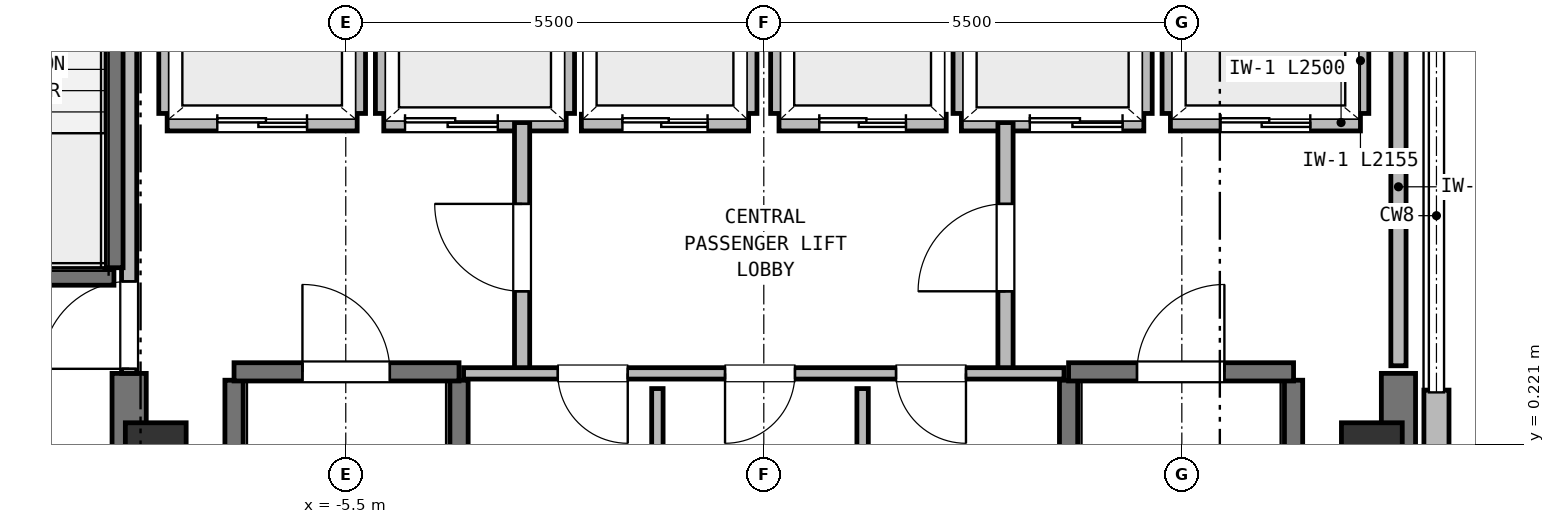
"""IFC4 building model, lengths in metres.
Left out: names, types, materials, properties, quantities, classifications, styles, units other than length and angle.
Written with IfcOpenShell. Run it as: python <this file> out.ifc"""

import sys

from ifc_helpers import new_model, si_unit, direction, frame, frame_2d, origin, origin_2d, place, context, subcontext, project, spatial, rectangle, extrude, element, fill, save


model = new_model("IFC4")
c1 = context("Model", 3, precision=1e-05, world=origin(), true_north=direction((0.0, 1.0)))
c2 = subcontext(c1, "Body", "Model", "MODEL_VIEW")
j1 = project(units=[si_unit("LENGTHUNIT", "METRE"), si_unit("PLANEANGLEUNIT", "RADIAN")], contexts=[c1])
p1 = place(None, origin())
s1 = spatial("IfcSite", under=j1, at=p1, CompositionType="ELEMENT")
p2 = place(p1, origin())
s2 = spatial("IfcBuilding", under=s1, at=p2, CompositionType="ELEMENT")
p3 = place(p2, frame((0.0, 0.0, 299.2)))
s3 = spatial("IfcBuildingStorey", under=s2, at=p3, CompositionType="ELEMENT", Elevation=299.2)
for number, where, z_axis, x_axis in (
    (1, (8.0, 0.0, 0.0), (0.0, 0.0, 1.0), (1.0, 0.0, 0.0)),
    (2, (-8.0, 0.0, 0.0), (0.0, 0.0, 1.0), (1.0, 0.0, 0.0)),
):
    element("IfcColumn", number, at=place(p3, frame(where, z_axis=z_axis, x_axis=x_axis)), inside=s3, PredefinedType="COLUMN", context=c2, shape_type="SweptSolid", body=[
        extrude(rectangle(XDim=0.8, YDim=1.0, at=origin_2d()), origin(), (0.0, 0.0, 1.0), 4.4),
    ])
for number, where, z_axis, x_axis in (
    (3, (-8.35, -6.95, 0.0), (0.0, 0.0, 1.0), (0.0, 1.0, 0.0)),
    (4, (8.35, -6.95, 0.0), (0.0, 0.0, 1.0), (0.0, 1.0, 0.0)),
):
    element("IfcWall", number, at=place(p3, frame(where, z_axis=z_axis, x_axis=x_axis)), inside=s3, PredefinedType="SHEAR", context=c2, shape_type="SweptSolid", body=[
        extrude(rectangle(XDim=8.1, YDim=0.45, at=frame_2d((4.05, 0.0))), origin(), (0.0, 0.0, 1.0), 4.12),
    ])
p4 = place(p3, frame((8.85, 0.93, 0.0), z_axis=(0.0, 0.0, 1.0), x_axis=(0.0, -1.0, 0.0)))
e5 = element("IfcWall", 5, at=p4, inside=s3, PredefinedType="SOLIDWALL", context=c2, shape_type="SweptSolid", body=[
    extrude(rectangle(XDim=1.86, YDim=0.33, at=frame_2d((0.93, 0.0))), origin(), (0.0, 0.0, 1.0), 4.12),
])
for number, where, z_axis, x_axis in (
    (6, (-6.97, -6.16, 0.0), (0.0, 0.0, 1.0), (0.0, 1.0, 0.0)),
    (7, (-4.01, -6.16, 0.0), (0.0, 0.0, 1.0), (0.0, 1.0, 0.0)),
):
    element("IfcWall", number, at=place(p3, frame(where, z_axis=z_axis, x_axis=x_axis)), inside=s3, PredefinedType="SHEAR", context=c2, shape_type="SweptSolid", body=[
        extrude(rectangle(XDim=7.22, YDim=0.24, at=frame_2d((3.61, 0.0))), origin(), (0.0, 0.0, 1.0), 4.12),
    ])
p5 = place(p3, frame((-6.97, 1.17, 0.0), z_axis=(0.0, 0.0, 1.0), x_axis=(1.0, 0.0, 0.0)))
e8 = element("IfcWall", 8, at=p5, inside=s3, PredefinedType="SHEAR", context=c2, shape_type="SweptSolid", body=[
    extrude(rectangle(XDim=2.96, YDim=0.24, at=frame_2d((1.48, 0.0))), origin(), (0.0, 0.0, 1.0), 4.12),
])
p6 = place(p5, frame((0.9, 0.0, 0.0)))
e9 = element("IfcOpeningElement", 9, at=p6, cuts=e8, PredefinedType="OPENING", context=c2, shape_type="SweptSolid", body=[
    extrude(rectangle(XDim=1.15, YDim=2.15, at=frame_2d((0.575, 1.075))), frame((0.0, 0.13, 0.0), z_axis=(0.0, -1.0, 0.0), x_axis=(1.0, 0.0, 0.0)), (0.0, 0.0, 1.0), 0.26),
])
for number, where, z_axis, x_axis in (
    (10, (4.01, -6.16, 0.0), (0.0, 0.0, 1.0), (0.0, 1.0, 0.0)),
    (11, (6.97, -6.16, 0.0), (0.0, 0.0, 1.0), (0.0, 1.0, 0.0)),
):
    element("IfcWall", number, at=place(p3, frame(where, z_axis=z_axis, x_axis=x_axis)), inside=s3, PredefinedType="SHEAR", context=c2, shape_type="SweptSolid", body=[
        extrude(rectangle(XDim=7.22, YDim=0.24, at=frame_2d((3.61, 0.0))), origin(), (0.0, 0.0, 1.0), 4.12),
    ])
p7 = place(p3, frame((4.01, 1.17, 0.0), z_axis=(0.0, 0.0, 1.0), x_axis=(1.0, 0.0, 0.0)))
e12 = element("IfcWall", 12, at=p7, inside=s3, PredefinedType="SHEAR", context=c2, shape_type="SweptSolid", body=[
    extrude(rectangle(XDim=2.96, YDim=0.24, at=frame_2d((1.48, 0.0))), origin(), (0.0, 0.0, 1.0), 4.12),
])
p8 = place(p7, frame((0.9, 0.0, 0.0)))
e13 = element("IfcOpeningElement", 13, at=p8, cuts=e12, PredefinedType="OPENING", context=c2, shape_type="SweptSolid", body=[
    extrude(rectangle(XDim=1.15, YDim=2.15, at=frame_2d((0.575, 1.075))), frame((0.0, 0.13, 0.0), z_axis=(0.0, -1.0, 0.0), x_axis=(1.0, 0.0, 0.0)), (0.0, 0.0, 1.0), 0.26),
])
p9 = place(p3, frame((-7.85, 4.45, 0.0), z_axis=(0.0, 0.0, 1.0), x_axis=(1.0, 0.0, 0.0)))
e14 = element("IfcWall", 14, at=p9, inside=s3, PredefinedType="PARTITIONING", context=c2, shape_type="SweptSolid", body=[
    extrude(rectangle(XDim=2.5, YDim=0.22, at=frame_2d((1.25, 0.0))), origin(), (0.0, 0.0, 1.0), 4.12),
])
p10 = place(p9, frame((0.66, 0.0, 0.0)))
e15 = element("IfcOpeningElement", 15, at=p10, cuts=e14, PredefinedType="OPENING", context=c2, shape_type="SweptSolid", body=[
    extrude(rectangle(XDim=1.18, YDim=2.15, at=frame_2d((0.59, 1.075))), frame((0.0, 0.12, 0.0), z_axis=(0.0, -1.0, 0.0), x_axis=(1.0, 0.0, 0.0)), (0.0, 0.0, 1.0), 0.24),
])
p11 = place(p3, frame((-7.85, 4.57, 0.0), z_axis=(0.0, 0.0, 1.0), x_axis=(0.0, 1.0, 0.0)))
e16 = element("IfcWall", 16, at=p11, inside=s3, PredefinedType="PARTITIONING", context=c2, shape_type="SweptSolid", body=[
    extrude(rectangle(XDim=2.155, YDim=0.22, at=frame_2d((1.078, 0.0))), origin(), (0.0, 0.0, 1.0), 3.8),
])
p12 = place(p3, frame((-5.35, 4.57, 0.0), z_axis=(0.0, 0.0, 1.0), x_axis=(0.0, 1.0, 0.0)))
e17 = element("IfcWall", 17, at=p12, inside=s3, PredefinedType="PARTITIONING", context=c2, shape_type="SweptSolid", body=[
    extrude(rectangle(XDim=2.155, YDim=0.22, at=frame_2d((1.078, 0.0))), origin(), (0.0, 0.0, 1.0), 4.12),
])
p13 = place(p3, frame((5.35, 4.45, 0.0), z_axis=(0.0, 0.0, 1.0), x_axis=(1.0, 0.0, 0.0)))
e18 = element("IfcWall", 18, at=p13, inside=s3, PredefinedType="PARTITIONING", context=c2, shape_type="SweptSolid", body=[
    extrude(rectangle(XDim=2.5, YDim=0.22, at=frame_2d((1.25, 0.0))), origin(), (0.0, 0.0, 1.0), 4.12),
])
p14 = place(p13, frame((0.66, 0.0, 0.0)))
e19 = element("IfcOpeningElement", 19, at=p14, cuts=e18, PredefinedType="OPENING", context=c2, shape_type="SweptSolid", body=[
    extrude(rectangle(XDim=1.18, YDim=2.15, at=frame_2d((0.59, 1.075))), frame((0.0, 0.12, 0.0), z_axis=(0.0, -1.0, 0.0), x_axis=(1.0, 0.0, 0.0)), (0.0, 0.0, 1.0), 0.24),
])
p15 = place(p3, frame((5.35, 4.57, 0.0), z_axis=(0.0, 0.0, 1.0), x_axis=(0.0, 1.0, 0.0)))
e20 = element("IfcWall", 20, at=p15, inside=s3, PredefinedType="PARTITIONING", context=c2, shape_type="SweptSolid", body=[
    extrude(rectangle(XDim=2.155, YDim=0.22, at=frame_2d((1.078, 0.0))), origin(), (0.0, 0.0, 1.0), 4.12),
])
p16 = place(p3, frame((7.85, 4.57, 0.0), z_axis=(0.0, 0.0, 1.0), x_axis=(0.0, 1.0, 0.0)))
e21 = element("IfcWall", 21, at=p16, inside=s3, PredefinedType="PARTITIONING", context=c2, shape_type="SweptSolid", body=[
    extrude(rectangle(XDim=2.155, YDim=0.22, at=frame_2d((1.078, 0.0))), origin(), (0.0, 0.0, 1.0), 3.8),
])
p17 = place(p3, frame((-5.0, 4.45, 0.0), z_axis=(0.0, 0.0, 1.0), x_axis=(1.0, 0.0, 0.0)))
e22 = element("IfcWall", 22, at=p17, inside=s3, PredefinedType="PARTITIONING", context=c2, shape_type="SweptSolid", body=[
    extrude(rectangle(XDim=2.4, YDim=0.22, at=frame_2d((1.2, 0.0))), origin(), (0.0, 0.0, 1.0), 4.12),
])
p18 = place(p17, frame((0.28, 0.0, 0.0)))
e23 = element("IfcOpeningElement", 23, at=p18, cuts=e22, PredefinedType="OPENING", context=c2, shape_type="SweptSolid", body=[
    extrude(rectangle(XDim=1.22, YDim=2.15, at=frame_2d((0.61, 1.075))), frame((0.0, 0.12, 0.0), z_axis=(0.0, -1.0, 0.0), x_axis=(1.0, 0.0, 0.0)), (0.0, 0.0, 1.0), 0.24),
])
for number, where, z_axis, x_axis in (
    (24, (-5.0, 4.57, 0.0), (0.0, 0.0, 1.0), (0.0, 1.0, 0.0)),
    (25, (-2.6, 4.57, 0.0), (0.0, 0.0, 1.0), (0.0, 1.0, 0.0)),
):
    element("IfcWall", number, at=place(p3, frame(where, z_axis=z_axis, x_axis=x_axis)), inside=s3, PredefinedType="PARTITIONING", context=c2, shape_type="SweptSolid", body=[
        extrude(rectangle(XDim=2.155, YDim=0.22, at=frame_2d((1.078, 0.0))), origin(), (0.0, 0.0, 1.0), 4.12),
    ])
p19 = place(p3, frame((2.6, 4.45, 0.0), z_axis=(0.0, 0.0, 1.0), x_axis=(1.0, 0.0, 0.0)))
e26 = element("IfcWall", 26, at=p19, inside=s3, PredefinedType="PARTITIONING", context=c2, shape_type="SweptSolid", body=[
    extrude(rectangle(XDim=2.4, YDim=0.22, at=frame_2d((1.2, 0.0))), origin(), (0.0, 0.0, 1.0), 4.12),
])
p20 = place(p19, frame((0.9, 0.0, 0.0)))
e27 = element("IfcOpeningElement", 27, at=p20, cuts=e26, PredefinedType="OPENING", context=c2, shape_type="SweptSolid", body=[
    extrude(rectangle(XDim=1.22, YDim=2.15, at=frame_2d((0.61, 1.075))), frame((0.0, 0.12, 0.0), z_axis=(0.0, -1.0, 0.0), x_axis=(1.0, 0.0, 0.0)), (0.0, 0.0, 1.0), 0.24),
])
for number, where, z_axis, x_axis in (
    (28, (2.6, 4.57, 0.0), (0.0, 0.0, 1.0), (0.0, 1.0, 0.0)),
    (29, (5.0, 4.57, 0.0), (0.0, 0.0, 1.0), (0.0, 1.0, 0.0)),
):
    element("IfcWall", number, at=place(p3, frame(where, z_axis=z_axis, x_axis=x_axis)), inside=s3, PredefinedType="PARTITIONING", context=c2, shape_type="SweptSolid", body=[
        extrude(rectangle(XDim=2.155, YDim=0.22, at=frame_2d((1.078, 0.0))), origin(), (0.0, 0.0, 1.0), 4.12),
    ])
p21 = place(p3, frame((-2.4, 4.45, 0.0), z_axis=(0.0, 0.0, 1.0), x_axis=(1.0, 0.0, 0.0)))
e30 = element("IfcWall", 30, at=p21, inside=s3, PredefinedType="PARTITIONING", context=c2, shape_type="SweptSolid", body=[
    extrude(rectangle(XDim=2.2, YDim=0.22, at=frame_2d((1.1, 0.0))), origin(), (0.0, 0.0, 1.0), 4.12),
])
p22 = place(p21, frame((0.54, 0.0, 0.0)))
e31 = element("IfcOpeningElement", 31, at=p22, cuts=e30, PredefinedType="OPENING", context=c2, shape_type="SweptSolid", body=[
    extrude(rectangle(XDim=1.12, YDim=2.15, at=frame_2d((0.56, 1.075))), frame((0.0, 0.12, 0.0), z_axis=(0.0, -1.0, 0.0), x_axis=(1.0, 0.0, 0.0)), (0.0, 0.0, 1.0), 0.24),
])
p23 = place(p3, frame((-0.2, 4.57, 0.0), z_axis=(0.0, 0.0, 1.0), x_axis=(0.0, 1.0, 0.0)))
e32 = element("IfcWall", 32, at=p23, inside=s3, PredefinedType="PARTITIONING", context=c2, shape_type="SweptSolid", body=[
    extrude(rectangle(XDim=2.155, YDim=0.22, at=frame_2d((1.078, 0.0))), origin(), (0.0, 0.0, 1.0), 4.12),
])
p24 = place(p3, frame((0.2, 4.45, 0.0), z_axis=(0.0, 0.0, 1.0), x_axis=(1.0, 0.0, 0.0)))
e33 = element("IfcWall", 33, at=p24, inside=s3, PredefinedType="PARTITIONING", context=c2, shape_type="SweptSolid", body=[
    extrude(rectangle(XDim=2.2, YDim=0.22, at=frame_2d((1.1, 0.0))), origin(), (0.0, 0.0, 1.0), 4.12),
])
p25 = place(p24, frame((0.53, 0.0, 0.0)))
e34 = element("IfcOpeningElement", 34, at=p25, cuts=e33, PredefinedType="OPENING", context=c2, shape_type="SweptSolid", body=[
    extrude(rectangle(XDim=1.14, YDim=2.15, at=frame_2d((0.57, 1.075))), frame((0.0, 0.12, 0.0), z_axis=(0.0, -1.0, 0.0), x_axis=(1.0, 0.0, 0.0)), (0.0, 0.0, 1.0), 0.24),
])
p26 = place(p3, frame((0.2, 4.57, 0.0), z_axis=(0.0, 0.0, 1.0), x_axis=(0.0, 1.0, 0.0)))
e35 = element("IfcWall", 35, at=p26, inside=s3, PredefinedType="PARTITIONING", context=c2, shape_type="SweptSolid", body=[
    extrude(rectangle(XDim=2.155, YDim=0.22, at=frame_2d((1.078, 0.0))), origin(), (0.0, 0.0, 1.0), 4.12),
])
p27 = place(p3, frame((-3.18, 1.15, 0.0), z_axis=(0.0, 0.0, 1.0), x_axis=(0.0, 1.0, 0.0)))
e36 = element("IfcWall", 36, at=p27, inside=s3, PredefinedType="PARTITIONING", context=c2, shape_type="SweptSolid", body=[
    extrude(rectangle(XDim=3.3, YDim=0.2, at=frame_2d((1.65, 0.0))), origin(), (0.0, 0.0, 1.0), 4.12),
])
p28 = place(p27, frame((1.08, 0.0, 0.0)))
e37 = element("IfcOpeningElement", 37, at=p28, cuts=e36, PredefinedType="OPENING", context=c2, shape_type="SweptSolid", body=[
    extrude(rectangle(XDim=1.15, YDim=2.15, at=frame_2d((0.575, 1.075))), frame((0.0, 0.11, 0.0), z_axis=(0.0, -1.0, 0.0), x_axis=(1.0, 0.0, 0.0)), (0.0, 0.0, 1.0), 0.22),
])
p29 = place(p3, frame((3.18, 1.15, 0.0), z_axis=(0.0, 0.0, 1.0), x_axis=(0.0, 1.0, 0.0)))
e38 = element("IfcWall", 38, at=p29, inside=s3, PredefinedType="PARTITIONING", context=c2, shape_type="SweptSolid", body=[
    extrude(rectangle(XDim=3.3, YDim=0.2, at=frame_2d((1.65, 0.0))), origin(), (0.0, 0.0, 1.0), 4.12),
])
p30 = place(p29, frame((1.08, 0.0, 0.0)))
e39 = element("IfcOpeningElement", 39, at=p30, cuts=e38, PredefinedType="OPENING", context=c2, shape_type="SweptSolid", body=[
    extrude(rectangle(XDim=1.15, YDim=2.15, at=frame_2d((0.575, 1.075))), frame((0.0, 0.11, 0.0), z_axis=(0.0, -1.0, 0.0), x_axis=(1.0, 0.0, 0.0)), (0.0, 0.0, 1.0), 0.22),
])
p31 = place(p3, frame((-8.35, 1.15, 0.0), z_axis=(0.0, 0.0, 1.0), x_axis=(0.0, 1.0, 0.0)))
e40 = element("IfcWall", 40, at=p31, inside=s3, PredefinedType="PARTITIONING", context=c2, shape_type="SweptSolid", body=[
    extrude(rectangle(XDim=5.4, YDim=0.2, at=frame_2d((2.7, 0.0))), origin(), (0.0, 0.0, 1.0), 4.12),
])
p32 = place(p31, frame((0.06, 0.0, 0.0)))
e41 = element("IfcOpeningElement", 41, at=p32, cuts=e40, PredefinedType="OPENING", context=c2, shape_type="SweptSolid", body=[
    extrude(rectangle(XDim=1.15, YDim=2.15, at=frame_2d((0.575, 1.075))), frame((0.0, 0.11, 0.0), z_axis=(0.0, -1.0, 0.0), x_axis=(1.0, 0.0, 0.0)), (0.0, 0.0, 1.0), 0.22),
])
p33 = place(p3, frame((8.35, 1.25, 0.0), z_axis=(0.0, 0.0, 1.0), x_axis=(0.0, 1.0, 0.0)))
e42 = element("IfcWall", 42, at=p33, inside=s3, PredefinedType="PARTITIONING", context=c2, shape_type="SweptSolid", body=[
    extrude(rectangle(XDim=5.3, YDim=0.2, at=frame_2d((2.65, 0.0))), origin(), (0.0, 0.0, 1.0), 4.12),
])
p34 = place(p3, frame((3.95, 1.15, 0.0), z_axis=(0.0, 0.0, 1.0), x_axis=(-1.0, 0.0, 0.0)))
e43 = element("IfcWall", 43, at=p34, inside=s3, PredefinedType="PARTITIONING", context=c2, shape_type="SweptSolid", body=[
    extrude(rectangle(XDim=7.9, YDim=0.15, at=frame_2d((3.95, 0.0))), origin(), (0.0, 0.0, 1.0), 4.12),
])
p35 = place(p34, frame((5.74, 0.0, 0.0)))
e44 = element("IfcOpeningElement", 44, at=p35, cuts=e43, PredefinedType="OPENING", context=c2, shape_type="SweptSolid", body=[
    extrude(rectangle(XDim=0.92, YDim=2.05, at=frame_2d((0.46, 1.025))), frame((0.0, 0.085, 0.0), z_axis=(0.0, -1.0, 0.0), x_axis=(1.0, 0.0, 0.0)), (0.0, 0.0, 1.0), 0.17),
])
p36 = place(p34, frame((3.54, 0.0, 0.0)))
e45 = element("IfcOpeningElement", 45, at=p36, cuts=e43, PredefinedType="OPENING", context=c2, shape_type="SweptSolid", body=[
    extrude(rectangle(XDim=0.92, YDim=2.05, at=frame_2d((0.46, 1.025))), frame((0.0, 0.085, 0.0), z_axis=(0.0, -1.0, 0.0), x_axis=(1.0, 0.0, 0.0)), (0.0, 0.0, 1.0), 0.17),
])
p37 = place(p34, frame((1.29, 0.0, 0.0)))
e46 = element("IfcOpeningElement", 46, at=p37, cuts=e43, PredefinedType="OPENING", context=c2, shape_type="SweptSolid", body=[
    extrude(rectangle(XDim=0.92, YDim=2.05, at=frame_2d((0.46, 1.025))), frame((0.0, 0.085, 0.0), z_axis=(0.0, -1.0, 0.0), x_axis=(1.0, 0.0, 0.0)), (0.0, 0.0, 1.0), 0.17),
])
for number, where, z_axis, x_axis in (
    (47, (-1.4, -6.58, 0.0), (0.0, 0.0, 1.0), (0.0, 1.0, 0.0)),
    (48, (1.3, -6.58, 0.0), (0.0, 0.0, 1.0), (0.0, 1.0, 0.0)),
):
    element("IfcWall", number, at=place(p3, frame(where, z_axis=z_axis, x_axis=x_axis)), inside=s3, PredefinedType="PARTITIONING", context=c2, shape_type="SweptSolid", body=[
        extrude(rectangle(XDim=7.53, YDim=0.15, at=frame_2d((3.765, 0.0))), origin(), (0.0, 0.0, 1.0), 4.12),
    ])
p38 = place(p3, frame((-11.51, 2.43, 0.0), z_axis=(0.0, 0.0, 1.0), x_axis=(1.0, 0.0, 0.0)))
e49 = element("IfcWall", 49, at=p38, inside=s3, PredefinedType="SHEAR", context=c2, shape_type="SweptSolid", body=[
    extrude(rectangle(XDim=2.96, YDim=0.24, at=frame_2d((1.48, 0.0))), origin(), (0.0, 0.0, 1.0), 4.12),
])
p39 = place(p3, frame((-8.55, 2.54, 0.0), z_axis=(0.0, 0.0, 1.0), x_axis=(0.0, 1.0, 0.0)))
e50 = element("IfcWall", 50, at=p39, inside=s3, PredefinedType="SHEAR", context=c2, shape_type="SweptSolid", body=[
    extrude(rectangle(XDim=6.42, YDim=0.24, at=frame_2d((3.21, 0.0))), origin(), (0.0, 0.0, 1.0), 4.12),
])
p40 = place(p6, origin())
e51 = element("IfcDoor", 51, at=p40, inside=s3, OperationType="SINGLE_SWING_LEFT", PredefinedType="DOOR", context=c2, shape_type="SweptSolid", body=[
    extrude(rectangle(XDim=1.15, YDim=2.15, at=frame_2d((0.575, 1.075))), frame((0.0, 0.025, 0.0), z_axis=(0.0, -1.0, 0.0), x_axis=(1.0, 0.0, 0.0)), (0.0, 0.0, 1.0), 0.05),
])
fill(e9, e51)
p41 = place(p8, origin())
e52 = element("IfcDoor", 52, at=p41, inside=s3, OperationType="SINGLE_SWING_RIGHT", PredefinedType="DOOR", context=c2, shape_type="SweptSolid", body=[
    extrude(rectangle(XDim=1.15, YDim=2.15, at=frame_2d((0.575, 1.075))), frame((0.0, 0.025, 0.0), z_axis=(0.0, -1.0, 0.0), x_axis=(1.0, 0.0, 0.0)), (0.0, 0.0, 1.0), 0.05),
])
fill(e13, e52)
p42 = place(p10, origin())
e53 = element("IfcDoor", 53, at=p42, inside=s3, OperationType="DOUBLE_DOOR_SLIDING", PredefinedType="DOOR", context=c2, shape_type="SweptSolid", body=[
    extrude(rectangle(XDim=1.18, YDim=2.15, at=frame_2d((0.59, 1.075))), frame((0.0, 0.025, 0.0), z_axis=(0.0, -1.0, 0.0), x_axis=(1.0, 0.0, 0.0)), (0.0, 0.0, 1.0), 0.05),
])
fill(e15, e53)
p43 = place(p14, origin())
e54 = element("IfcDoor", 54, at=p43, inside=s3, OperationType="DOUBLE_DOOR_SLIDING", PredefinedType="DOOR", context=c2, shape_type="SweptSolid", body=[
    extrude(rectangle(XDim=1.18, YDim=2.15, at=frame_2d((0.59, 1.075))), frame((0.0, 0.025, 0.0), z_axis=(0.0, -1.0, 0.0), x_axis=(1.0, 0.0, 0.0)), (0.0, 0.0, 1.0), 0.05),
])
fill(e19, e54)
p44 = place(p18, origin())
e55 = element("IfcDoor", 55, at=p44, inside=s3, OperationType="DOUBLE_DOOR_SLIDING", PredefinedType="DOOR", context=c2, shape_type="SweptSolid", body=[
    extrude(rectangle(XDim=1.22, YDim=2.15, at=frame_2d((0.61, 1.075))), frame((0.0, 0.025, 0.0), z_axis=(0.0, -1.0, 0.0), x_axis=(1.0, 0.0, 0.0)), (0.0, 0.0, 1.0), 0.05),
])
fill(e23, e55)
p45 = place(p20, origin())
e56 = element("IfcDoor", 56, at=p45, inside=s3, OperationType="DOUBLE_DOOR_SLIDING", PredefinedType="DOOR", context=c2, shape_type="SweptSolid", body=[
    extrude(rectangle(XDim=1.22, YDim=2.15, at=frame_2d((0.61, 1.075))), frame((0.0, 0.025, 0.0), z_axis=(0.0, -1.0, 0.0), x_axis=(1.0, 0.0, 0.0)), (0.0, 0.0, 1.0), 0.05),
])
fill(e27, e56)
p46 = place(p22, origin())
e57 = element("IfcDoor", 57, at=p46, inside=s3, OperationType="DOUBLE_DOOR_SLIDING", PredefinedType="DOOR", context=c2, shape_type="SweptSolid", body=[
    extrude(rectangle(XDim=1.12, YDim=2.15, at=frame_2d((0.56, 1.075))), frame((0.0, 0.025, 0.0), z_axis=(0.0, -1.0, 0.0), x_axis=(1.0, 0.0, 0.0)), (0.0, 0.0, 1.0), 0.05),
])
fill(e31, e57)
p47 = place(p25, origin())
e58 = element("IfcDoor", 58, at=p47, inside=s3, OperationType="DOUBLE_DOOR_SLIDING", PredefinedType="DOOR", context=c2, shape_type="SweptSolid", body=[
    extrude(rectangle(XDim=1.14, YDim=2.15, at=frame_2d((0.57, 1.075))), frame((0.0, 0.025, 0.0), z_axis=(0.0, -1.0, 0.0), x_axis=(1.0, 0.0, 0.0)), (0.0, 0.0, 1.0), 0.05),
])
fill(e34, e58)
p48 = place(p28, origin())
e59 = element("IfcDoor", 59, at=p48, inside=s3, OperationType="SINGLE_SWING_RIGHT", PredefinedType="DOOR", context=c2, shape_type="SweptSolid", body=[
    extrude(rectangle(XDim=1.15, YDim=2.15, at=frame_2d((0.575, 1.075))), frame((0.0, 0.025, 0.0), z_axis=(0.0, -1.0, 0.0), x_axis=(1.0, 0.0, 0.0)), (0.0, 0.0, 1.0), 0.05),
])
fill(e37, e59)
p49 = place(p30, origin())
e60 = element("IfcDoor", 60, at=p49, inside=s3, OperationType="SINGLE_SWING_LEFT", PredefinedType="DOOR", context=c2, shape_type="SweptSolid", body=[
    extrude(rectangle(XDim=1.15, YDim=2.15, at=frame_2d((0.575, 1.075))), frame((0.0, 0.025, 0.0), z_axis=(0.0, -1.0, 0.0), x_axis=(1.0, 0.0, 0.0)), (0.0, 0.0, 1.0), 0.05),
])
fill(e39, e60)
p50 = place(p32, origin())
e61 = element("IfcDoor", 61, at=p50, inside=s3, OperationType="SINGLE_SWING_LEFT", PredefinedType="DOOR", context=c2, shape_type="SweptSolid", body=[
    extrude(rectangle(XDim=1.15, YDim=2.15, at=frame_2d((0.575, 1.075))), frame((0.0, 0.025, 0.0), z_axis=(0.0, -1.0, 0.0), x_axis=(1.0, 0.0, 0.0)), (0.0, 0.0, 1.0), 0.05),
])
fill(e41, e61)
p51 = place(p35, origin())
e62 = element("IfcDoor", 62, at=p51, inside=s3, OperationType="SINGLE_SWING_LEFT", PredefinedType="DOOR", context=c2, shape_type="SweptSolid", body=[
    extrude(rectangle(XDim=0.92, YDim=2.05, at=frame_2d((0.46, 1.025))), frame((0.0, 0.025, 0.0), z_axis=(0.0, -1.0, 0.0), x_axis=(1.0, 0.0, 0.0)), (0.0, 0.0, 1.0), 0.05),
])
fill(e44, e62)
p52 = place(p36, origin())
e63 = element("IfcDoor", 63, at=p52, inside=s3, OperationType="SINGLE_SWING_RIGHT", PredefinedType="DOOR", context=c2, shape_type="SweptSolid", body=[
    extrude(rectangle(XDim=0.92, YDim=2.05, at=frame_2d((0.46, 1.025))), frame((0.0, 0.025, 0.0), z_axis=(0.0, -1.0, 0.0), x_axis=(1.0, 0.0, 0.0)), (0.0, 0.0, 1.0), 0.05),
])
fill(e45, e63)
p53 = place(p37, origin())
e64 = element("IfcDoor", 64, at=p53, inside=s3, OperationType="SINGLE_SWING_LEFT", PredefinedType="DOOR", context=c2, shape_type="SweptSolid", body=[
    extrude(rectangle(XDim=0.92, YDim=2.05, at=frame_2d((0.46, 1.025))), frame((0.0, 0.025, 0.0), z_axis=(0.0, -1.0, 0.0), x_axis=(1.0, 0.0, 0.0)), (0.0, 0.0, 1.0), 0.05),
])
fill(e46, e64)
save(model, sys.argv[1])
